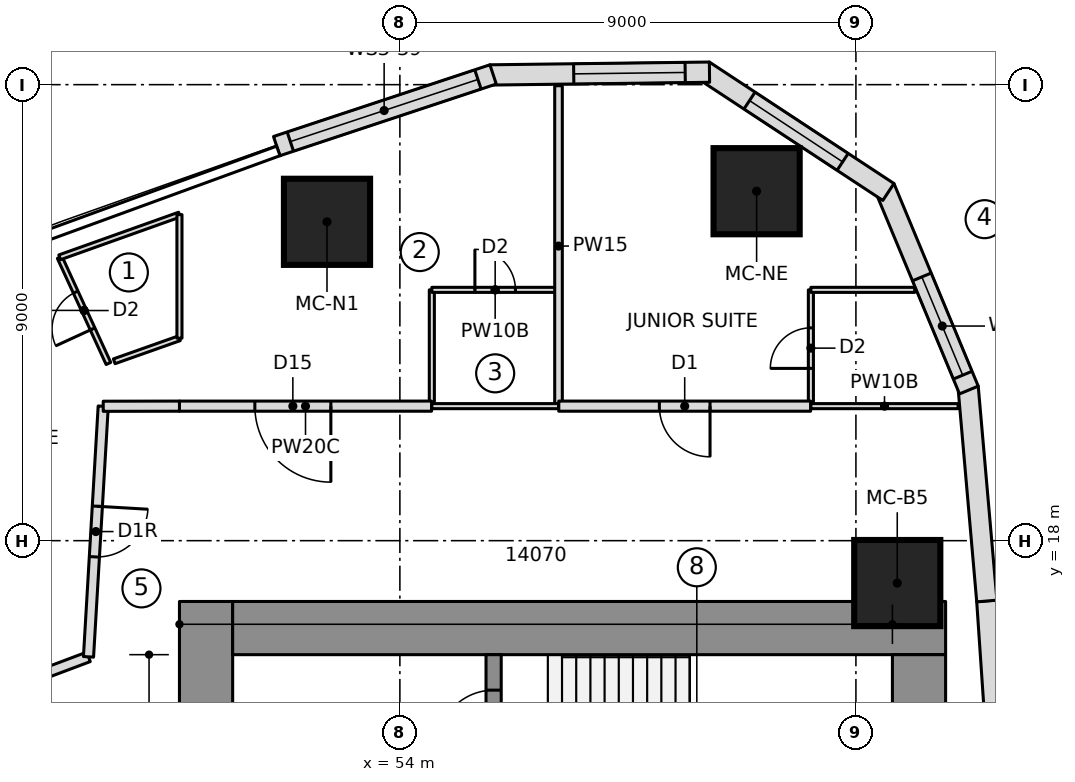
"""IFC4 building model, lengths in metres.
Left out: names, types, materials, properties, quantities, classifications, styles, units other than length and angle.
Written with IfcOpenShell. Run it as: python <this file> out.ifc"""

import sys

from ifc_helpers import new_model, si_unit, direction, frame, frame_2d, origin, origin_2d, place, context, subcontext, project, spatial, polyline, rectangle, outline, extrude, element, fill, save


model = new_model("IFC4")
c1 = context("Model", 3, precision=1e-05, world=origin(), true_north=direction((0.0, 1.0)))
c2 = subcontext(c1, "Body", "Model", "MODEL_VIEW")
j1 = project(units=[si_unit("LENGTHUNIT", "METRE"), si_unit("PLANEANGLEUNIT", "RADIAN")], contexts=[c1])
p1 = place(None, origin())
s1 = spatial("IfcSite", under=j1, at=p1, CompositionType="ELEMENT")
p2 = place(p1, origin())
s2 = spatial("IfcBuilding", under=s1, at=p2, CompositionType="ELEMENT")
p3 = place(p2, frame((0.0, 0.0, 99.1)))
s3 = spatial("IfcBuildingStorey", under=s2, at=p3, CompositionType="ELEMENT", Elevation=99.1)
p4 = place(p3, frame((50.175, 6.65, 0.0), z_axis=(0.0, 0.0, 1.0), x_axis=(0.0, 1.0, 0.0)))
e1 = element("IfcWall", 1, at=p4, inside=s3, PredefinedType="SHEAR", context=c2, shape_type="SweptSolid", body=[
    extrude(rectangle(XDim=10.15, YDim=1.05, at=frame_2d((5.075, 0.0))), origin(), (0.0, 0.0, 1.0), 3.55),
])
p5 = place(p4, frame((6.5, 0.0, 0.0)))
e2 = element("IfcOpeningElement", 2, at=p5, cuts=e1, PredefinedType="OPENING", context=c2, shape_type="SweptSolid", body=[
    extrude(rectangle(XDim=1.1, YDim=2.1, at=frame_2d((0.55, 1.05))), frame((0.0, 0.535, 0.0), z_axis=(0.0, -1.0, 0.0), x_axis=(1.0, 0.0, 0.0)), (0.0, 0.0, 1.0), 1.07),
])
p6 = place(p3, frame((50.7, 16.275, 0.0), z_axis=(0.0, 0.0, 1.0), x_axis=(1.0, 0.0, 0.0)))
e3 = element("IfcWall", 3, at=p6, inside=s3, PredefinedType="SHEAR", context=c2, shape_type="SweptSolid", body=[
    extrude(rectangle(XDim=14.07, YDim=1.05, at=frame_2d((7.035, 0.0))), origin(), (0.0, 0.0, 1.0), 3.55),
])
p7 = place(p3, frame((64.245, 9.389, 0.0), z_axis=(0.0, 0.0, 1.0), x_axis=(0.0, 1.0, 0.0)))
e4 = element("IfcWall", 4, at=p7, inside=s3, PredefinedType="SHEAR", context=c2, shape_type="SweptSolid", body=[
    extrude(rectangle(XDim=6.361, YDim=1.05, at=frame_2d((3.181, 0.0))), origin(), (0.0, 0.0, 1.0), 3.55),
])
p8 = place(p3, frame((55.85, 10.35, 0.0), z_axis=(0.0, 0.0, 1.0), x_axis=(0.0, 1.0, 0.0)))
e5 = element("IfcWall", 5, at=p8, inside=s3, PredefinedType="SHEAR", context=c2, shape_type="SweptSolid", body=[
    extrude(rectangle(XDim=5.4, YDim=0.3, at=frame_2d((2.7, 0.0))), origin(), (0.0, 0.0, 1.0), 3.55),
])
p9 = place(p8, frame((1.43, 0.0, 0.0)))
e6 = element("IfcOpeningElement", 6, at=p9, cuts=e5, PredefinedType="OPENING", context=c2, shape_type="SweptSolid", body=[
    extrude(rectangle(XDim=1.1, YDim=2.1, at=frame_2d((0.55, 1.05))), frame((0.0, 0.16, 0.0), z_axis=(0.0, -1.0, 0.0), x_axis=(1.0, 0.0, 0.0)), (0.0, 0.0, 1.0), 0.32),
])
p10 = place(p8, frame((3.6, 0.0, 0.0)))
e7 = element("IfcOpeningElement", 7, at=p10, cuts=e5, PredefinedType="OPENING", context=c2, shape_type="SweptSolid", body=[
    extrude(rectangle(XDim=1.1, YDim=2.1, at=frame_2d((0.55, 1.05))), frame((0.0, 0.16, 0.0), z_axis=(0.0, -1.0, 0.0), x_axis=(1.0, 0.0, 0.0)), (0.0, 0.0, 1.0), 0.32),
])
for number, where, z_axis, x_axis in (
    (8, (63.816, 17.164, 0.0), (0.0, 0.0, 1.0), (1.0, 0.0, 0.0)),
    (9, (61.04, 24.897, 0.0), (0.0, 0.0, 1.0), (1.0, 0.0, 0.0)),
    (10, (52.562, 24.293, 0.0), (0.0, 0.0, 1.0), (1.0, 0.0, 0.0)),
):
    element("IfcColumn", number, at=place(p3, frame(where, z_axis=z_axis, x_axis=x_axis)), inside=s3, PredefinedType="COLUMN", context=c2, shape_type="SweptSolid", body=[
        extrude(rectangle(XDim=1.7, YDim=1.7, at=origin_2d()), origin(), (0.0, 0.0, 1.0), 3.55),
    ])
p11 = place(p3, frame((65.868, 12.614, 0.0), z_axis=(0.0, 0.0, 1.0), x_axis=(-0.067724559895, 0.997704056315, 0.0)))
e11 = element("IfcWall", 11, at=p11, inside=s3, PredefinedType="NOTDEFINED", context=c2, shape_type="SweptSolid", body=[
    extrude(outline(polyline([(-0.002, -0.2), (4.209, -0.2), (4.205, 0.2), (0.002, 0.2), (-0.002, -0.2)])), origin(), (0.0, 0.0, 1.0), 3.25),
])
p12 = place(p3, frame((65.583, 16.811, 0.0), z_axis=(0.0, 0.0, 1.0), x_axis=(-0.086992730434, 0.996208946382, 0.0)))
e12 = element("IfcWall", 12, at=p12, inside=s3, PredefinedType="NOTDEFINED", context=c2, shape_type="SweptSolid", body=[
    extrude(outline(polyline([(-0.002, -0.2), (4.238, -0.2), (4.176, 0.2), (0.002, 0.2), (-0.002, -0.2)])), origin(), (0.0, 0.0, 1.0), 3.25),
])
p13 = place(p3, frame((65.217, 21.002, 0.0), z_axis=(0.0, 0.0, 1.0), x_axis=(-0.383997751971, 0.923334027577, 0.0)))
e13 = element("IfcWall", 13, at=p13, inside=s3, PredefinedType="NOTDEFINED", context=c2, shape_type="SweptSolid", body=[
    extrude(outline(polyline([(-0.031, -0.2), (4.3, -0.2), (4.177, 0.2), (0.031, 0.2), (-0.031, -0.2)])), origin(), (0.0, 0.0, 1.0), 3.25),
])
p14 = place(p13, frame((0.287, 0.0, 0.6)))
e14 = element("IfcOpeningElement", 14, at=p14, cuts=e13, PredefinedType="OPENING", context=c2, shape_type="SweptSolid", body=[
    extrude(outline(polyline([(0.0, 1.4), (0.08, 1.802), (0.308, 2.142), (0.648, 2.37), (1.05, 2.45), (1.452, 2.37), (1.792, 2.142), (2.02, 1.802), (2.1, 1.4), (2.1, 1.05), (2.02, 0.648), (1.792, 0.308), (1.452, 0.08), (1.05, 0.0), (0.648, 0.08), (0.308, 0.308), (0.08, 0.648), (0.0, 1.05), (0.0, 1.4)])), frame((0.0, 0.21, 0.0), z_axis=(0.0, -1.0, 0.0), x_axis=(1.0, 0.0, 0.0)), (0.0, 0.0, 1.0), 0.42),
])
p15 = place(p3, frame((63.59, 24.916, 0.0), z_axis=(0.0, 0.0, 1.0), x_axis=(-0.835340523653, 0.549732852887, 0.0)))
e15 = element("IfcWall", 15, at=p15, inside=s3, PredefinedType="NOTDEFINED", context=c2, shape_type="SweptSolid", body=[
    extrude(outline(polyline([(-0.061, -0.2), (4.3, -0.2), (4.178, 0.2), (0.061, 0.2), (-0.061, -0.2)])), origin(), (0.0, 0.0, 1.0), 3.25),
])
p16 = place(p15, frame((1.02, 0.0, 0.6)))
e16 = element("IfcOpeningElement", 16, at=p16, cuts=e15, PredefinedType="OPENING", context=c2, shape_type="SweptSolid", body=[
    extrude(outline(polyline([(0.0, 1.35), (0.084, 1.771), (0.322, 2.128), (0.679, 2.366), (1.1, 2.45), (1.521, 2.366), (1.878, 2.128), (2.116, 1.771), (2.2, 1.35), (2.2, 1.1), (2.116, 0.679), (1.878, 0.322), (1.521, 0.084), (1.1, 0.0), (0.679, 0.084), (0.322, 0.322), (0.084, 0.679), (0.0, 1.1), (0.0, 1.35)])), frame((0.0, 0.21, 0.0), z_axis=(0.0, -1.0, 0.0), x_axis=(1.0, 0.0, 0.0)), (0.0, 0.0, 1.0), 0.42),
])
p17 = place(p3, frame((60.049, 27.246, 0.0), z_axis=(0.0, 0.0, 1.0), x_axis=(-0.999919718849, -0.012671063772, 0.0)))
e17 = element("IfcWall", 17, at=p17, inside=s3, PredefinedType="NOTDEFINED", context=c2, shape_type="SweptSolid", body=[
    extrude(outline(polyline([(-0.061, -0.2), (4.27, -0.2), (4.208, 0.2), (0.061, 0.2), (-0.061, -0.2)])), origin(), (0.0, 0.0, 1.0), 3.25),
])
p18 = place(p17, frame((0.418, 0.0, 0.6)))
e18 = element("IfcOpeningElement", 18, at=p18, cuts=e17, PredefinedType="OPENING", context=c2, shape_type="SweptSolid", body=[
    extrude(outline(polyline([(0.0, 1.35), (0.084, 1.771), (0.322, 2.128), (0.679, 2.366), (1.1, 2.45), (1.521, 2.366), (1.878, 2.128), (2.116, 1.771), (2.2, 1.35), (2.2, 1.1), (2.116, 0.679), (1.878, 0.322), (1.521, 0.084), (1.1, 0.0), (0.679, 0.084), (0.322, 0.322), (0.084, 0.679), (0.0, 1.1), (0.0, 1.35)])), frame((0.0, 0.21, 0.0), z_axis=(0.0, -1.0, 0.0), x_axis=(1.0, 0.0, 0.0)), (0.0, 0.0, 1.0), 0.42),
])
p19 = place(p3, frame((55.81, 27.192, 0.0), z_axis=(0.0, 0.0, 1.0), x_axis=(-0.94925004851, -0.314522408429, 0.0)))
e19 = element("IfcWall", 19, at=p19, inside=s3, PredefinedType="NOTDEFINED", context=c2, shape_type="SweptSolid", body=[
    extrude(outline(polyline([(-0.031, -0.2), (4.468, -0.2), (4.468, 0.2), (0.031, 0.2), (-0.031, -0.2)])), origin(), (0.0, 0.0, 1.0), 3.25),
])
p20 = place(p19, frame((0.284, 0.0, 0.9)))
e20 = element("IfcOpeningElement", 20, at=p20, cuts=e19, PredefinedType="OPENING", context=c2, shape_type="SweptSolid", body=[
    extrude(rectangle(XDim=3.9, YDim=1.8, at=frame_2d((1.95, 0.9))), frame((0.0, 0.21, 0.0), z_axis=(0.0, -1.0, 0.0), x_axis=(1.0, 0.0, 0.0)), (0.0, 0.0, 1.0), 0.42),
])
p21 = place(p3, frame((54.631, 20.65, 0.0), z_axis=(0.0, 0.0, 1.0), x_axis=(0.0, 1.0, 0.0)))
e21 = element("IfcWall", 21, at=p21, inside=s3, PredefinedType="PARTITIONING", context=c2, shape_type="SweptSolid", body=[
    extrude(rectangle(XDim=2.3, YDim=0.1, at=frame_2d((1.15, 0.0))), origin(), (0.0, 0.0, 1.0), 3.25),
])
p22 = place(p3, frame((54.631, 22.95, 0.0), z_axis=(0.0, 0.0, 1.0), x_axis=(1.0, 0.0, 0.0)))
e22 = element("IfcWall", 22, at=p22, inside=s3, PredefinedType="PARTITIONING", context=c2, shape_type="SweptSolid", body=[
    extrude(rectangle(XDim=2.5, YDim=0.1, at=frame_2d((1.25, 0.0))), origin(), (0.0, 0.0, 1.0), 3.25),
])
p23 = place(p22, frame((0.85, 0.0, 0.0)))
e23 = element("IfcOpeningElement", 23, at=p23, cuts=e22, PredefinedType="OPENING", context=c2, shape_type="SweptSolid", body=[
    extrude(rectangle(XDim=0.8, YDim=2.1, at=frame_2d((0.4, 1.05))), frame((0.0, 0.06, 0.0), z_axis=(0.0, -1.0, 0.0), x_axis=(1.0, 0.0, 0.0)), (0.0, 0.0, 1.0), 0.12),
])
p24 = place(p3, frame((62.111, 20.65, 0.0), z_axis=(0.0, 0.0, 1.0), x_axis=(0.0, 1.0, 0.0)))
e24 = element("IfcWall", 24, at=p24, inside=s3, PredefinedType="PARTITIONING", context=c2, shape_type="SweptSolid", body=[
    extrude(rectangle(XDim=2.3, YDim=0.1, at=frame_2d((1.15, 0.0))), origin(), (0.0, 0.0, 1.0), 3.25),
])
p25 = place(p24, frame((0.75, 0.0, 0.0)))
e25 = element("IfcOpeningElement", 25, at=p25, cuts=e24, PredefinedType="OPENING", context=c2, shape_type="SweptSolid", body=[
    extrude(rectangle(XDim=0.8, YDim=2.1, at=frame_2d((0.4, 1.05))), frame((0.0, 0.06, 0.0), z_axis=(0.0, -1.0, 0.0), x_axis=(1.0, 0.0, 0.0)), (0.0, 0.0, 1.0), 0.12),
])
p26 = place(p3, frame((62.111, 22.95, 0.0), z_axis=(0.0, 0.0, 1.0), x_axis=(1.0, 0.0, 0.0)))
e26 = element("IfcWall", 26, at=p26, inside=s3, PredefinedType="PARTITIONING", context=c2, shape_type="SweptSolid", body=[
    extrude(rectangle(XDim=2.049, YDim=0.1, at=frame_2d((1.025, 0.0))), origin(), (0.0, 0.0, 1.0), 3.25),
])
p27 = place(p3, frame((57.131, 20.65, 0.0), z_axis=(0.0, 0.0, 1.0), x_axis=(0.0, 1.0, 0.0)))
e27 = element("IfcWall", 27, at=p27, inside=s3, PredefinedType="PARTITIONING", context=c2, shape_type="SweptSolid", body=[
    extrude(rectangle(XDim=6.329, YDim=0.15, at=frame_2d((3.165, 0.0))), origin(), (0.0, 0.0, 1.0), 3.25),
])
p28 = place(p3, frame((49.65, 21.996, 0.0), z_axis=(0.0, 0.0, 1.0), x_axis=(-0.942692856107, -0.333661773425, 0.0)))
e28 = element("IfcWall", 28, at=p28, inside=s3, PredefinedType="PARTITIONING", context=c2, shape_type="SweptSolid", body=[
    extrude(rectangle(XDim=1.365, YDim=0.1, at=frame_2d((0.683, 0.0))), origin(), (0.0, 0.0, 1.0), 3.25),
])
p29 = place(p3, frame((48.249, 21.497, 0.0), z_axis=(0.0, 0.0, 1.0), x_axis=(-0.41749308293, 0.908680100864, 0.0)))
e29 = element("IfcWall", 29, at=p29, inside=s3, PredefinedType="PARTITIONING", context=c2, shape_type="SweptSolid", body=[
    extrude(rectangle(XDim=2.306, YDim=0.1, at=frame_2d((1.153, 0.0))), origin(), (0.0, 0.0, 1.0), 3.25),
])
p30 = place(p29, frame((0.75, 0.0, 0.0)))
e30 = element("IfcOpeningElement", 30, at=p30, cuts=e29, PredefinedType="OPENING", context=c2, shape_type="SweptSolid", body=[
    extrude(rectangle(XDim=0.8, YDim=2.1, at=frame_2d((0.4, 1.05))), frame((0.0, 0.06, 0.0), z_axis=(0.0, -1.0, 0.0), x_axis=(1.0, 0.0, 0.0)), (0.0, 0.0, 1.0), 0.12),
])
p31 = place(p3, frame((54.625, 20.655, 0.0), z_axis=(0.0, 0.0, 1.0), x_axis=(-1.0, 0.0, 0.0)))
e31 = element("IfcWall", 31, at=p31, inside=s3, PredefinedType="PARTITIONING", context=c2, shape_type="SweptSolid", body=[
    extrude(rectangle(XDim=4.976, YDim=0.2, at=frame_2d((2.488, 0.0))), origin(), (0.0, 0.0, 1.0), 3.25),
])
p32 = place(p31, frame((1.988, 0.0, 0.0)))
e32 = element("IfcOpeningElement", 32, at=p32, cuts=e31, PredefinedType="OPENING", context=c2, shape_type="SweptSolid", body=[
    extrude(rectangle(XDim=1.5, YDim=2.1, at=frame_2d((0.75, 1.05))), frame((0.0, 0.11, 0.0), z_axis=(0.0, -1.0, 0.0), x_axis=(1.0, 0.0, 0.0)), (0.0, 0.0, 1.0), 0.22),
])
p33 = place(p3, frame((62.106, 20.655, 0.0), z_axis=(0.0, 0.0, 1.0), x_axis=(-1.0, 0.0, 0.0)))
e33 = element("IfcWall", 33, at=p33, inside=s3, PredefinedType="PARTITIONING", context=c2, shape_type="SweptSolid", body=[
    extrude(rectangle(XDim=4.971, YDim=0.2, at=frame_2d((2.485, 0.0))), origin(), (0.0, 0.0, 1.0), 3.25),
])
p34 = place(p33, frame((1.985, 0.0, 0.0)))
e34 = element("IfcOpeningElement", 34, at=p34, cuts=e33, PredefinedType="OPENING", context=c2, shape_type="SweptSolid", body=[
    extrude(rectangle(XDim=1.0, YDim=2.1, at=frame_2d((0.5, 1.05))), frame((0.0, 0.11, 0.0), z_axis=(0.0, -1.0, 0.0), x_axis=(1.0, 0.0, 0.0)), (0.0, 0.0, 1.0), 0.22),
])
p35 = place(p3, frame((57.131, 20.655, 0.0), z_axis=(0.0, 0.0, 1.0), x_axis=(-1.0, 0.0, 0.0)))
e35 = element("IfcWall", 35, at=p35, inside=s3, PredefinedType="PARTITIONING", context=c2, shape_type="SweptSolid", body=[
    extrude(rectangle(XDim=2.5, YDim=0.1, at=frame_2d((1.25, 0.0))), origin(), (0.0, 0.0, 1.0), 3.25),
])
p36 = place(p3, frame((65.017, 20.655, 0.0), z_axis=(0.0, 0.0, 1.0), x_axis=(-1.0, 0.0, 0.0)))
e36 = element("IfcWall", 36, at=p36, inside=s3, PredefinedType="PARTITIONING", context=c2, shape_type="SweptSolid", body=[
    extrude(rectangle(XDim=2.906, YDim=0.1, at=frame_2d((1.453, 0.0))), origin(), (0.0, 0.0, 1.0), 3.25),
])
p37 = place(p3, frame((47.286, 23.592, 0.0), z_axis=(0.0, 0.0, 1.0), x_axis=(0.941933231826, 0.335800218555, 0.0)))
e37 = element("IfcWall", 37, at=p37, inside=s3, PredefinedType="PARTITIONING", context=c2, shape_type="SweptSolid", body=[
    extrude(rectangle(XDim=2.51, YDim=0.1, at=frame_2d((1.255, 0.0))), origin(), (0.0, 0.0, 1.0), 3.25),
])
p38 = place(p3, frame((49.65, 24.435, 0.0), z_axis=(0.0, 0.0, 1.0), x_axis=(0.0, -1.0, 0.0)))
e38 = element("IfcWall", 38, at=p38, inside=s3, PredefinedType="PARTITIONING", context=c2, shape_type="SweptSolid", body=[
    extrude(rectangle(XDim=2.439, YDim=0.1, at=frame_2d((1.22, 0.0))), origin(), (0.0, 0.0, 1.0), 3.25),
])
p39 = place(p3, frame((47.855, 15.707, 0.0), z_axis=(0.0, 0.0, 1.0), x_axis=(-0.935803526171, -0.35252199989, 0.0)))
e39 = element("IfcWall", 39, at=p39, inside=s3, PredefinedType="PARTITIONING", context=c2, shape_type="SweptSolid", body=[
    extrude(rectangle(XDim=0.995, YDim=0.2, at=frame_2d((0.497, 0.0))), origin(), (0.0, 0.0, 1.0), 3.25),
])
p40 = place(p3, frame((48.146, 20.652, 0.0), z_axis=(0.0, 0.0, 1.0), x_axis=(-0.058649792989, -0.998278619315, 0.0)))
e40 = element("IfcWall", 40, at=p40, inside=s3, PredefinedType="PARTITIONING", context=c2, shape_type="SweptSolid", body=[
    extrude(rectangle(XDim=4.954, YDim=0.2, at=frame_2d((2.477, 0.0))), origin(), (0.0, 0.0, 1.0), 3.25),
])
p41 = place(p40, frame((1.977, 0.0, 0.0)))
e41 = element("IfcOpeningElement", 41, at=p41, cuts=e40, PredefinedType="OPENING", context=c2, shape_type="SweptSolid", body=[
    extrude(rectangle(XDim=1.0, YDim=2.1, at=frame_2d((0.5, 1.05))), frame((0.0, 0.11, 0.0), z_axis=(0.0, -1.0, 0.0), x_axis=(1.0, 0.0, 0.0)), (0.0, 0.0, 1.0), 0.22),
])
p42 = place(p3, frame((49.65, 20.655, 0.0), z_axis=(0.0, 0.0, 1.0), x_axis=(-0.999998406651, -0.001785131852, 0.0)))
e42 = element("IfcWall", 42, at=p42, inside=s3, PredefinedType="PARTITIONING", context=c2, shape_type="SweptSolid", body=[
    extrude(rectangle(XDim=1.504, YDim=0.2, at=frame_2d((0.752, 0.0))), origin(), (0.0, 0.0, 1.0), 3.25),
])
p43 = place(p14, origin())
e43 = element("IfcWindow", 43, at=p43, inside=s3, PartitioningType="SINGLE_PANEL", PredefinedType="WINDOW", context=c2, shape_type="SweptSolid", body=[
    extrude(outline(polyline([(0.0, 1.4), (0.08, 1.802), (0.308, 2.142), (0.648, 2.37), (1.05, 2.45), (1.452, 2.37), (1.792, 2.142), (2.02, 1.802), (2.1, 1.4), (2.1, 1.05), (2.02, 0.648), (1.792, 0.308), (1.452, 0.08), (1.05, 0.0), (0.648, 0.08), (0.308, 0.308), (0.08, 0.648), (0.0, 1.05), (0.0, 1.4)])), frame((0.0, 0.17, 0.0), z_axis=(0.0, -1.0, 0.0), x_axis=(1.0, 0.0, 0.0)), (0.0, 0.0, 1.0), 0.06),
])
fill(e14, e43)
p44 = place(p16, origin())
e44 = element("IfcWindow", 44, at=p44, inside=s3, PartitioningType="SINGLE_PANEL", PredefinedType="WINDOW", context=c2, shape_type="SweptSolid", body=[
    extrude(outline(polyline([(0.0, 1.35), (0.084, 1.771), (0.322, 2.128), (0.679, 2.366), (1.1, 2.45), (1.521, 2.366), (1.878, 2.128), (2.116, 1.771), (2.2, 1.35), (2.2, 1.1), (2.116, 0.679), (1.878, 0.322), (1.521, 0.084), (1.1, 0.0), (0.679, 0.084), (0.322, 0.322), (0.084, 0.679), (0.0, 1.1), (0.0, 1.35)])), frame((0.0, 0.17, 0.0), z_axis=(0.0, -1.0, 0.0), x_axis=(1.0, 0.0, 0.0)), (0.0, 0.0, 1.0), 0.06),
])
fill(e16, e44)
p45 = place(p18, origin())
e45 = element("IfcWindow", 45, at=p45, inside=s3, PartitioningType="SINGLE_PANEL", PredefinedType="WINDOW", context=c2, shape_type="SweptSolid", body=[
    extrude(outline(polyline([(0.0, 1.35), (0.084, 1.771), (0.322, 2.128), (0.679, 2.366), (1.1, 2.45), (1.521, 2.366), (1.878, 2.128), (2.116, 1.771), (2.2, 1.35), (2.2, 1.1), (2.116, 0.679), (1.878, 0.322), (1.521, 0.084), (1.1, 0.0), (0.679, 0.084), (0.322, 0.322), (0.084, 0.679), (0.0, 1.1), (0.0, 1.35)])), frame((0.0, 0.17, 0.0), z_axis=(0.0, -1.0, 0.0), x_axis=(1.0, 0.0, 0.0)), (0.0, 0.0, 1.0), 0.06),
])
fill(e18, e45)
p46 = place(p20, origin())
e46 = element("IfcWindow", 46, at=p46, inside=s3, PartitioningType="SINGLE_PANEL", PredefinedType="WINDOW", context=c2, shape_type="SweptSolid", body=[
    extrude(rectangle(XDim=3.9, YDim=1.8, at=frame_2d((1.95, 0.9))), frame((0.0, 0.17, 0.0), z_axis=(0.0, -1.0, 0.0), x_axis=(1.0, 0.0, 0.0)), (0.0, 0.0, 1.0), 0.06),
])
fill(e20, e46)
p47 = place(p23, origin())
e47 = element("IfcDoor", 47, at=p47, inside=s3, OperationType="SINGLE_SWING_LEFT", PredefinedType="DOOR", context=c2, shape_type="SweptSolid", body=[
    extrude(rectangle(XDim=0.8, YDim=2.1, at=frame_2d((0.4, 1.05))), frame((0.0, 0.025, 0.0), z_axis=(0.0, -1.0, 0.0), x_axis=(1.0, 0.0, 0.0)), (0.0, 0.0, 1.0), 0.05),
])
fill(e23, e47)
p48 = place(p25, origin())
e48 = element("IfcDoor", 48, at=p48, inside=s3, OperationType="SINGLE_SWING_LEFT", PredefinedType="DOOR", context=c2, shape_type="SweptSolid", body=[
    extrude(rectangle(XDim=0.8, YDim=2.1, at=frame_2d((0.4, 1.05))), frame((0.0, 0.025, 0.0), z_axis=(0.0, -1.0, 0.0), x_axis=(1.0, 0.0, 0.0)), (0.0, 0.0, 1.0), 0.05),
])
fill(e25, e48)
p49 = place(p30, origin())
e49 = element("IfcDoor", 49, at=p49, inside=s3, OperationType="SINGLE_SWING_LEFT", PredefinedType="DOOR", context=c2, shape_type="SweptSolid", body=[
    extrude(rectangle(XDim=0.8, YDim=2.1, at=frame_2d((0.4, 1.05))), frame((0.0, 0.025, 0.0), z_axis=(0.0, -1.0, 0.0), x_axis=(1.0, 0.0, 0.0)), (0.0, 0.0, 1.0), 0.05),
])
fill(e30, e49)
p50 = place(p32, origin())
e50 = element("IfcDoor", 50, at=p50, inside=s3, OperationType="DOUBLE_DOOR_SINGLE_SWING", PredefinedType="DOOR", context=c2, shape_type="SweptSolid", body=[
    extrude(rectangle(XDim=1.5, YDim=2.1, at=frame_2d((0.75, 1.05))), frame((0.0, 0.025, 0.0), z_axis=(0.0, -1.0, 0.0), x_axis=(1.0, 0.0, 0.0)), (0.0, 0.0, 1.0), 0.05),
])
fill(e32, e50)
p51 = place(p34, origin())
e51 = element("IfcDoor", 51, at=p51, inside=s3, OperationType="SINGLE_SWING_LEFT", PredefinedType="DOOR", context=c2, shape_type="SweptSolid", body=[
    extrude(rectangle(XDim=1.0, YDim=2.1, at=frame_2d((0.5, 1.05))), frame((0.0, 0.025, 0.0), z_axis=(0.0, -1.0, 0.0), x_axis=(1.0, 0.0, 0.0)), (0.0, 0.0, 1.0), 0.05),
])
fill(e34, e51)
p52 = place(p41, origin())
e52 = element("IfcDoor", 52, at=p52, inside=s3, OperationType="SINGLE_SWING_RIGHT", PredefinedType="DOOR", context=c2, shape_type="SweptSolid", body=[
    extrude(rectangle(XDim=1.0, YDim=2.1, at=frame_2d((0.5, 1.05))), frame((0.0, 0.025, 0.0), z_axis=(0.0, -1.0, 0.0), x_axis=(1.0, 0.0, 0.0)), (0.0, 0.0, 1.0), 0.05),
])
fill(e41, e52)
p53 = place(p10, origin())
e53 = element("IfcDoor", 53, at=p53, inside=s3, OperationType="SINGLE_SWING_RIGHT", PredefinedType="DOOR", context=c2, shape_type="SweptSolid", body=[
    extrude(rectangle(XDim=1.1, YDim=2.1, at=frame_2d((0.55, 1.05))), frame((0.0, 0.025, 0.0), z_axis=(0.0, -1.0, 0.0), x_axis=(1.0, 0.0, 0.0)), (0.0, 0.0, 1.0), 0.05),
])
fill(e7, e53)
save(model, sys.argv[1])
